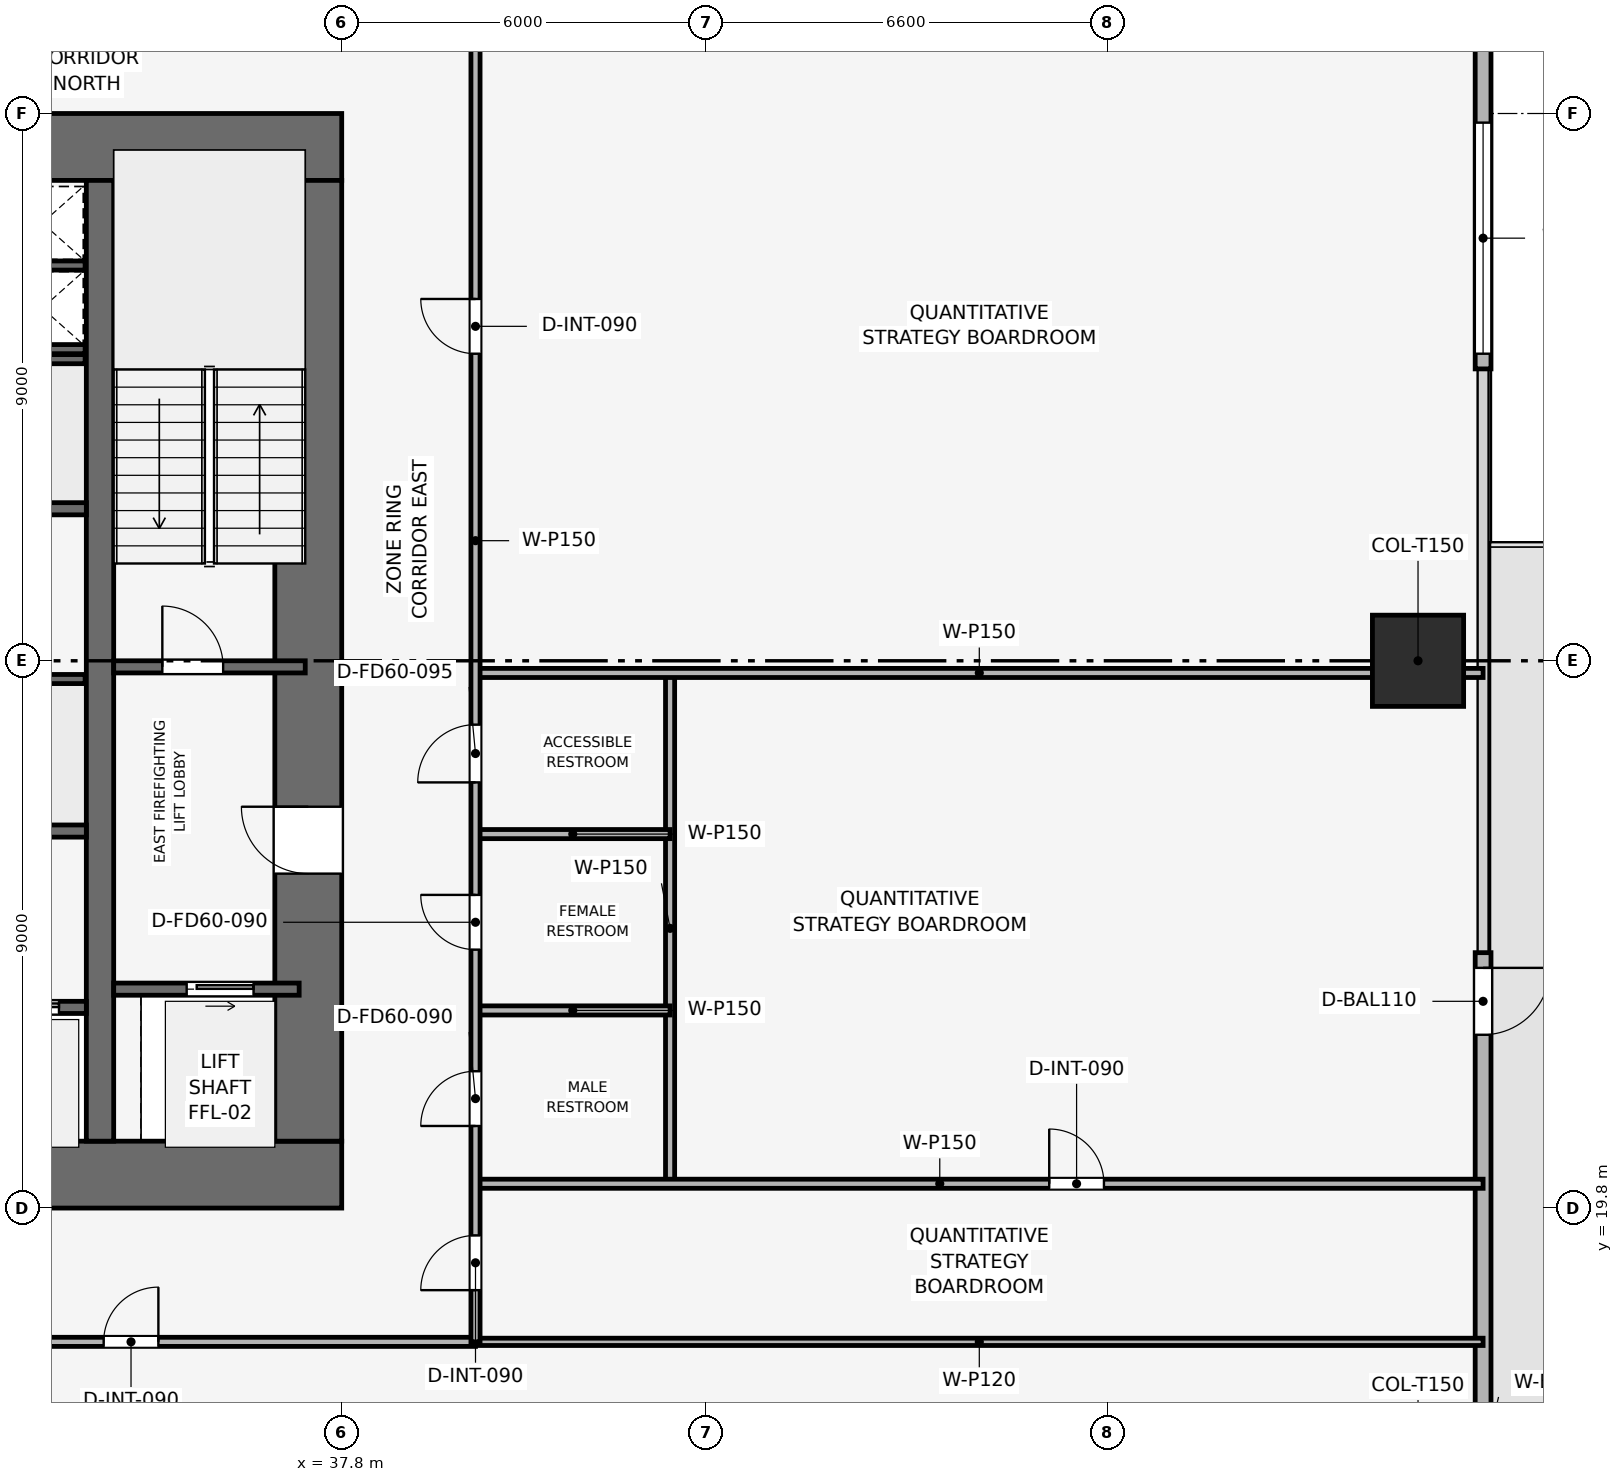
"""IFC4 building model, lengths in metres.
Left out: names, types, materials, properties, quantities, classifications, styles, units other than length and angle.
Written with IfcOpenShell. Run it as: python <this file> out.ifc"""

import sys

from ifc_helpers import new_model, si_unit, direction, frame, frame_2d, origin, origin_2d, place, context, subcontext, project, spatial, rectangle, extrude, element, fill, save


model = new_model("IFC4")
c1 = context("Model", 3, precision=1e-05, world=origin(), true_north=direction((0.0, 1.0)))
c2 = subcontext(c1, "Body", "Model", "MODEL_VIEW")
j1 = project(units=[si_unit("LENGTHUNIT", "METRE"), si_unit("PLANEANGLEUNIT", "RADIAN")], contexts=[c1])
p1 = place(None, origin())
s1 = spatial("IfcSite", under=j1, at=p1, CompositionType="ELEMENT")
p2 = place(p1, origin())
s2 = spatial("IfcBuilding", under=s1, at=p2, CompositionType="ELEMENT")
p3 = place(p2, frame((0.0, 0.0, 88.5)))
s3 = spatial("IfcBuildingStorey", under=s2, at=p3, CompositionType="ELEMENT", Elevation=88.5)
p4 = place(p3, frame((19.8, 20.35, 0.0), z_axis=(0.0, 0.0, 1.0), x_axis=(1.0, 0.0, 0.0)))
e1 = element("IfcWall", 1, at=p4, inside=s3, PredefinedType="SHEAR", context=c2, shape_type="SweptSolid", body=[
    extrude(rectangle(XDim=18.0, YDim=1.1, at=frame_2d((9.0, 0.0))), origin(), (0.0, 0.0, 1.0), 3.9),
])
p5 = place(p4, frame((8.4, 0.0, 0.0)))
e2 = element("IfcOpeningElement", 2, at=p5, cuts=e1, PredefinedType="OPENING", context=c2, shape_type="SweptSolid", body=[
    extrude(rectangle(XDim=1.2, YDim=2.2, at=frame_2d((0.6, 1.1))), frame((0.0, 0.56, 0.0), z_axis=(0.0, -1.0, 0.0), x_axis=(1.0, 0.0, 0.0)), (0.0, 0.0, 1.0), 1.12),
])
p6 = place(p3, frame((19.8, 37.25, 0.0), z_axis=(0.0, 0.0, 1.0), x_axis=(1.0, 0.0, 0.0)))
e3 = element("IfcWall", 3, at=p6, inside=s3, PredefinedType="SHEAR", context=c2, shape_type="SweptSolid", body=[
    extrude(rectangle(XDim=18.0, YDim=1.1, at=frame_2d((9.0, 0.0))), origin(), (0.0, 0.0, 1.0), 3.9),
])
p7 = place(p6, frame((7.05, 0.0, 0.0)))
e4 = element("IfcOpeningElement", 4, at=p7, cuts=e3, PredefinedType="OPENING", context=c2, shape_type="SweptSolid", body=[
    extrude(rectangle(XDim=1.1, YDim=2.15, at=frame_2d((0.55, 1.075))), frame((0.0, 0.56, 0.0), z_axis=(0.0, -1.0, 0.0), x_axis=(1.0, 0.0, 0.0)), (0.0, 0.0, 1.0), 1.12),
])
p8 = place(p3, frame((37.25, 20.9, 0.0), z_axis=(0.0, 0.0, 1.0), x_axis=(0.0, 1.0, 0.0)))
e5 = element("IfcWall", 5, at=p8, inside=s3, PredefinedType="SHEAR", context=c2, shape_type="SweptSolid", body=[
    extrude(rectangle(XDim=15.8, YDim=1.1, at=frame_2d((7.9, 0.0))), origin(), (0.0, 0.0, 1.0), 3.9),
])
p9 = place(p8, frame((4.4, 0.0, 0.0)))
e6 = element("IfcOpeningElement", 6, at=p9, cuts=e5, PredefinedType="OPENING", context=c2, shape_type="SweptSolid", body=[
    extrude(rectangle(XDim=1.1, YDim=2.15, at=frame_2d((0.55, 1.075))), frame((0.0, 0.56, 0.0), z_axis=(0.0, -1.0, 0.0), x_axis=(1.0, 0.0, 0.0)), (0.0, 0.0, 1.0), 1.12),
])
p10 = place(p3, frame((33.825, 20.9, 0.0), z_axis=(0.0, 0.0, 1.0), x_axis=(0.0, 1.0, 0.0)))
e7 = element("IfcWall", 7, at=p10, inside=s3, PredefinedType="SHEAR", context=c2, shape_type="SweptSolid", body=[
    extrude(rectangle(XDim=15.8, YDim=0.45, at=frame_2d((7.9, 0.0))), origin(), (0.0, 0.0, 1.0), 3.9),
])
p11 = place(p3, frame((55.5, 28.8, 0.003), z_axis=(0.0, 0.0, 1.0), x_axis=(1.0, 0.0, 0.0)))
e8 = element("IfcColumn", 8, at=p11, inside=s3, PredefinedType="COLUMN", context=c2, shape_type="SweptSolid", body=[
    extrude(rectangle(XDim=1.5, YDim=1.5, at=origin_2d()), origin(), (0.0, 0.0, 1.0), 3.644),
])
p12 = place(p3, frame((56.57, 48.9, 0.0), z_axis=(0.0, 0.0, 1.0), x_axis=(0.0, -1.0, 0.0)))
e9 = element("IfcWall", 9, at=p12, inside=s3, PredefinedType="SOLIDWALL", context=c2, shape_type="SweptSolid", body=[
    extrude(rectangle(XDim=15.3, YDim=0.26, at=frame_2d((7.65, 0.0))), origin(), (0.0, 0.0, 1.0), 3.65),
])
p13 = place(p12, frame((11.25, 0.0, 0.9)))
e10 = element("IfcOpeningElement", 10, at=p13, cuts=e9, PredefinedType="OPENING", context=c2, shape_type="SweptSolid", body=[
    extrude(rectangle(XDim=3.8, YDim=1.9, at=frame_2d((1.9, 0.95))), frame((0.0, 0.14, 0.0), z_axis=(0.0, -1.0, 0.0), x_axis=(1.0, 0.0, 0.0)), (0.0, 0.0, 1.0), 0.28),
])
p14 = place(p3, frame((56.57, 24.0, 0.0), z_axis=(0.0, 0.0, 1.0), x_axis=(0.0, -1.0, 0.0)))
e11 = element("IfcWall", 11, at=p14, inside=s3, PredefinedType="SOLIDWALL", context=c2, shape_type="SweptSolid", body=[
    extrude(rectangle(XDim=15.3, YDim=0.26, at=frame_2d((7.65, 0.0))), origin(), (0.0, 0.0, 1.0), 3.65),
])
p15 = place(p14, frame((0.25, 0.0, 0.0)))
e12 = element("IfcOpeningElement", 12, at=p15, cuts=e11, PredefinedType="OPENING", context=c2, shape_type="SweptSolid", body=[
    extrude(rectangle(XDim=1.1, YDim=2.2, at=frame_2d((0.55, 1.1))), frame((0.0, 0.14, 0.0), z_axis=(0.0, -1.0, 0.0), x_axis=(1.0, 0.0, 0.0)), (0.0, 0.0, 1.0), 0.28),
])
p16 = place(p3, frame((34.05, 28.7, 0.0), z_axis=(0.0, 0.0, 1.0), x_axis=(1.0, 0.0, 0.0)))
e13 = element("IfcWall", 13, at=p16, inside=s3, PredefinedType="SHEAR", context=c2, shape_type="SweptSolid", body=[
    extrude(rectangle(XDim=3.15, YDim=0.2, at=frame_2d((1.575, 0.0))), origin(), (0.0, 0.0, 1.0), 3.65),
])
p17 = place(p16, frame((0.8, 0.0, 0.0)))
e14 = element("IfcOpeningElement", 14, at=p17, cuts=e13, PredefinedType="OPENING", context=c2, shape_type="SweptSolid", body=[
    extrude(rectangle(XDim=1.0, YDim=2.1, at=frame_2d((0.5, 1.05))), frame((0.0, 0.11, 0.0), z_axis=(0.0, -1.0, 0.0), x_axis=(1.0, 0.0, 0.0)), (0.0, 0.0, 1.0), 0.22),
])
for number, where, z_axis, x_axis in (
    (15, (32.25, 33.925, 0.0), (0.0, 0.0, 1.0), (1.0, 0.0, 0.0)),
    (16, (32.25, 35.3, 0.0), (0.0, 0.0, 1.0), (1.0, 0.0, 0.0)),
):
    element("IfcWall", number, at=place(p3, frame(where, z_axis=z_axis, x_axis=x_axis)), inside=s3, PredefinedType="SHEAR", context=c2, shape_type="SweptSolid", body=[
        extrude(rectangle(XDim=1.33, YDim=0.15, at=frame_2d((0.665, 0.0))), origin(), (0.0, 0.0, 1.0), 3.65),
    ])
p18 = place(p3, frame((34.05, 23.4, 0.0), z_axis=(0.0, 0.0, 1.0), x_axis=(1.0, 0.0, 0.0)))
e17 = element("IfcWall", 17, at=p18, inside=s3, PredefinedType="SHEAR", context=c2, shape_type="SweptSolid", body=[
    extrude(rectangle(XDim=3.05, YDim=0.2, at=frame_2d((1.525, 0.0))), origin(), (0.0, 0.0, 1.0), 3.65),
])
p19 = place(p18, frame((1.2, 0.0, 0.0)))
e18 = element("IfcOpeningElement", 18, at=p19, cuts=e17, PredefinedType="OPENING", context=c2, shape_type="SweptSolid", body=[
    extrude(rectangle(XDim=1.1, YDim=2.15, at=frame_2d((0.55, 1.075))), frame((0.0, 0.11, 0.0), z_axis=(0.0, -1.0, 0.0), x_axis=(1.0, 0.0, 0.0)), (0.0, 0.0, 1.0), 0.22),
])
p20 = place(p3, frame((31.6, 23.1, 0.0), z_axis=(0.0, 0.0, 1.0), x_axis=(1.0, 0.0, 0.0)))
e19 = element("IfcWall", 19, at=p20, inside=s3, PredefinedType="SHEAR", context=c2, shape_type="SweptSolid", body=[
    extrude(rectangle(XDim=2.0, YDim=0.2, at=frame_2d((1.0, 0.0))), origin(), (0.0, 0.0, 1.0), 3.65),
])
p21 = place(p20, frame((0.45, 0.0, 0.0)))
e20 = element("IfcOpeningElement", 20, at=p21, cuts=e19, PredefinedType="OPENING", context=c2, shape_type="SweptSolid", body=[
    extrude(rectangle(XDim=1.1, YDim=2.15, at=frame_2d((0.55, 1.075))), frame((0.0, 0.11, 0.0), z_axis=(0.0, -1.0, 0.0), x_axis=(1.0, 0.0, 0.0)), (0.0, 0.0, 1.0), 0.22),
])
for number, where, z_axis, x_axis in (
    (21, (31.6, 26.0, 0.0), (0.0, 0.0, 1.0), (1.0, 0.0, 0.0)),
    (22, (31.6, 31.3, 0.0), (0.0, 0.0, 1.0), (1.0, 0.0, 0.0)),
):
    element("IfcWall", number, at=place(p3, frame(where, z_axis=z_axis, x_axis=x_axis)), inside=s3, PredefinedType="SHEAR", context=c2, shape_type="SweptSolid", body=[
        extrude(rectangle(XDim=2.0, YDim=0.2, at=frame_2d((1.0, 0.0))), origin(), (0.0, 0.0, 1.0), 3.65),
    ])
for number, where, z_axis, x_axis in (
    (23, (29.5, 28.5, 0.0), (0.0, 0.0, 1.0), (1.0, 0.0, 0.0)),
    (24, (29.5, 33.76, 0.0), (0.0, 0.0, 1.0), (1.0, 0.0, 0.0)),
):
    element("IfcWall", number, at=place(p3, frame(where, z_axis=z_axis, x_axis=x_axis)), inside=s3, PredefinedType="SHEAR", context=c2, shape_type="SweptSolid", body=[
        extrude(rectangle(XDim=4.08, YDim=0.15, at=frame_2d((2.04, 0.0))), origin(), (0.0, 0.0, 1.0), 3.65),
    ])
p22 = place(p3, frame((40.0, 17.6, 0.0), z_axis=(0.0, 0.0, 1.0), x_axis=(1.0, 0.0, 0.0)))
e25 = element("IfcWall", 25, at=p22, inside=s3, PredefinedType="PARTITIONING", context=c2, shape_type="SweptSolid", body=[
    extrude(rectangle(XDim=16.57, YDim=0.12, at=frame_2d((8.285, 0.0))), origin(), (0.0, 0.0, 1.0), 2.935),
])
p23 = place(p3, frame((43.2, 20.2, 0.0), z_axis=(0.0, 0.0, 1.0), x_axis=(0.0, 1.0, 0.0)))
e26 = element("IfcWall", 26, at=p23, inside=s3, PredefinedType="PARTITIONING", context=c2, shape_type="SweptSolid", body=[
    extrude(rectangle(XDim=8.4, YDim=0.15, at=frame_2d((4.2, 0.0))), origin(), (0.0, 0.0, 1.0), 3.085),
])
p24 = place(p3, frame((40.0, 20.2, 0.0), z_axis=(0.0, 0.0, 1.0), x_axis=(1.0, 0.0, 0.0)))
e27 = element("IfcWall", 27, at=p24, inside=s3, PredefinedType="PARTITIONING", context=c2, shape_type="SweptSolid", body=[
    extrude(rectangle(XDim=16.57, YDim=0.15, at=frame_2d((8.285, 0.0))), origin(), (0.0, 0.0, 1.0), 2.935),
])
p25 = place(p24, frame((9.435, 0.0, 0.0)))
e28 = element("IfcOpeningElement", 28, at=p25, cuts=e27, PredefinedType="OPENING", context=c2, shape_type="SweptSolid", body=[
    extrude(rectangle(XDim=0.9, YDim=2.1, at=frame_2d((0.45, 1.05))), frame((0.0, 0.085, 0.0), z_axis=(0.0, -1.0, 0.0), x_axis=(1.0, 0.0, 0.0)), (0.0, 0.0, 1.0), 0.17),
])
p26 = place(p3, frame((40.0, 28.6, 0.0), z_axis=(0.0, 0.0, 1.0), x_axis=(1.0, 0.0, 0.0)))
e29 = element("IfcWall", 29, at=p26, inside=s3, PredefinedType="PARTITIONING", context=c2, shape_type="SweptSolid", body=[
    extrude(rectangle(XDim=16.57, YDim=0.15, at=frame_2d((8.285, 0.0))), origin(), (0.0, 0.0, 1.0), 2.935),
])
for number, where, z_axis, x_axis in (
    (30, (40.0, 23.05, 0.0), (0.0, 0.0, 1.0), (1.0, 0.0, 0.0)),
    (31, (40.0, 25.95, 0.0), (0.0, 0.0, 1.0), (1.0, 0.0, 0.0)),
):
    element("IfcWall", number, at=place(p3, frame(where, z_axis=z_axis, x_axis=x_axis)), inside=s3, PredefinedType="PARTITIONING", context=c2, shape_type="SweptSolid", body=[
        extrude(rectangle(XDim=3.2, YDim=0.15, at=frame_2d((1.6, 0.0))), origin(), (0.0, 0.0, 1.0), 3.65),
    ])
p27 = place(p3, frame((17.6, 17.6, 0.0), z_axis=(0.0, 0.0, 1.0), x_axis=(1.0, 0.0, 0.0)))
e32 = element("IfcWall", 32, at=p27, inside=s3, PredefinedType="PARTITIONING", context=c2, shape_type="SweptSolid", body=[
    extrude(rectangle(XDim=22.4, YDim=0.15, at=frame_2d((11.2, 0.0))), origin(), (0.0, 0.0, 1.0), 3.085),
])
p28 = place(p27, frame((0.72, 0.0, 0.0)))
e33 = element("IfcOpeningElement", 33, at=p28, cuts=e32, PredefinedType="OPENING", context=c2, shape_type="SweptSolid", body=[
    extrude(rectangle(XDim=0.9, YDim=2.1, at=frame_2d((0.45, 1.05))), frame((0.0, 0.085, 0.0), z_axis=(0.0, -1.0, 0.0), x_axis=(1.0, 0.0, 0.0)), (0.0, 0.0, 1.0), 0.17),
])
p29 = place(p27, frame((6.255, 0.0, 0.0)))
e34 = element("IfcOpeningElement", 34, at=p29, cuts=e32, PredefinedType="OPENING", context=c2, shape_type="SweptSolid", body=[
    extrude(rectangle(XDim=0.9, YDim=2.1, at=frame_2d((0.45, 1.05))), frame((0.0, 0.085, 0.0), z_axis=(0.0, -1.0, 0.0), x_axis=(1.0, 0.0, 0.0)), (0.0, 0.0, 1.0), 0.17),
])
p30 = place(p27, frame((16.285, 0.0, 0.0)))
e35 = element("IfcOpeningElement", 35, at=p30, cuts=e32, PredefinedType="OPENING", context=c2, shape_type="SweptSolid", body=[
    extrude(rectangle(XDim=0.9, YDim=2.1, at=frame_2d((0.45, 1.05))), frame((0.0, 0.085, 0.0), z_axis=(0.0, -1.0, 0.0), x_axis=(1.0, 0.0, 0.0)), (0.0, 0.0, 1.0), 0.17),
])
p31 = place(p3, frame((40.0, 17.6, 0.0), z_axis=(0.0, 0.0, 1.0), x_axis=(0.0, 1.0, 0.0)))
e36 = element("IfcWall", 36, at=p31, inside=s3, PredefinedType="PARTITIONING", context=c2, shape_type="SweptSolid", body=[
    extrude(rectangle(XDim=22.4, YDim=0.15, at=frame_2d((11.2, 0.0))), origin(), (0.0, 0.0, 1.0), 3.085),
])
p32 = place(p31, frame((0.85, 0.0, 0.0)))
e37 = element("IfcOpeningElement", 37, at=p32, cuts=e36, PredefinedType="OPENING", context=c2, shape_type="SweptSolid", body=[
    extrude(rectangle(XDim=0.9, YDim=2.1, at=frame_2d((0.45, 1.05))), frame((0.0, 0.085, 0.0), z_axis=(0.0, -1.0, 0.0), x_axis=(1.0, 0.0, 0.0)), (0.0, 0.0, 1.0), 0.17),
])
p33 = place(p31, frame((3.55, 0.0, 0.0)))
e38 = element("IfcOpeningElement", 38, at=p33, cuts=e36, PredefinedType="OPENING", context=c2, shape_type="SweptSolid", body=[
    extrude(rectangle(XDim=0.9, YDim=2.1, at=frame_2d((0.45, 1.05))), frame((0.0, 0.085, 0.0), z_axis=(0.0, -1.0, 0.0), x_axis=(1.0, 0.0, 0.0)), (0.0, 0.0, 1.0), 0.17),
])
p34 = place(p31, frame((6.45, 0.0, 0.0)))
e39 = element("IfcOpeningElement", 39, at=p34, cuts=e36, PredefinedType="OPENING", context=c2, shape_type="SweptSolid", body=[
    extrude(rectangle(XDim=0.9, YDim=2.1, at=frame_2d((0.45, 1.05))), frame((0.0, 0.085, 0.0), z_axis=(0.0, -1.0, 0.0), x_axis=(1.0, 0.0, 0.0)), (0.0, 0.0, 1.0), 0.17),
])
p35 = place(p31, frame((9.2, 0.0, 0.0)))
e40 = element("IfcOpeningElement", 40, at=p35, cuts=e36, PredefinedType="OPENING", context=c2, shape_type="SweptSolid", body=[
    extrude(rectangle(XDim=0.95, YDim=2.1, at=frame_2d((0.475, 1.05))), frame((0.0, 0.085, 0.0), z_axis=(0.0, -1.0, 0.0), x_axis=(1.0, 0.0, 0.0)), (0.0, 0.0, 1.0), 0.17),
])
p36 = place(p31, frame((16.25, 0.0, 0.0)))
e41 = element("IfcOpeningElement", 41, at=p36, cuts=e36, PredefinedType="OPENING", context=c2, shape_type="SweptSolid", body=[
    extrude(rectangle(XDim=0.9, YDim=2.1, at=frame_2d((0.45, 1.05))), frame((0.0, 0.085, 0.0), z_axis=(0.0, -1.0, 0.0), x_axis=(1.0, 0.0, 0.0)), (0.0, 0.0, 1.0), 0.17),
])
p37 = place(p15, origin())
e42 = element("IfcDoor", 42, at=p37, inside=s3, OperationType="SINGLE_SWING_LEFT", PredefinedType="DOOR", context=c2, shape_type="SweptSolid", body=[
    extrude(rectangle(XDim=1.1, YDim=2.2, at=frame_2d((0.55, 1.1))), frame((0.0, 0.025, 0.0), z_axis=(0.0, -1.0, 0.0), x_axis=(1.0, 0.0, 0.0)), (0.0, 0.0, 1.0), 0.05),
])
fill(e12, e42)
p38 = place(p13, origin())
e43 = element("IfcWindow", 43, at=p38, inside=s3, PartitioningType="SINGLE_PANEL", PredefinedType="WINDOW", context=c2, shape_type="SweptSolid", body=[
    extrude(rectangle(XDim=3.8, YDim=1.9, at=frame_2d((1.9, 0.95))), frame((0.0, 0.03, 0.0), z_axis=(0.0, -1.0, 0.0), x_axis=(1.0, 0.0, 0.0)), (0.0, 0.0, 1.0), 0.06),
])
fill(e10, e43)
p39 = place(p17, origin())
e44 = element("IfcDoor", 44, at=p39, inside=s3, OperationType="SINGLE_SWING_LEFT", PredefinedType="DOOR", context=c2, shape_type="SweptSolid", body=[
    extrude(rectangle(XDim=1.0, YDim=2.1, at=frame_2d((0.5, 1.05))), frame((0.0, 0.025, 0.0), z_axis=(0.0, -1.0, 0.0), x_axis=(1.0, 0.0, 0.0)), (0.0, 0.0, 1.0), 0.05),
])
fill(e14, e44)
p40 = place(p19, origin())
e45 = element("IfcDoor", 45, at=p40, inside=s3, OperationType="SLIDING_TO_RIGHT", PredefinedType="DOOR", context=c2, shape_type="SweptSolid", body=[
    extrude(rectangle(XDim=1.1, YDim=2.15, at=frame_2d((0.55, 1.075))), frame((0.0, 0.025, 0.0), z_axis=(0.0, -1.0, 0.0), x_axis=(1.0, 0.0, 0.0)), (0.0, 0.0, 1.0), 0.05),
])
fill(e18, e45)
p41 = place(p21, origin())
e46 = element("IfcDoor", 46, at=p41, inside=s3, OperationType="SLIDING_TO_RIGHT", PredefinedType="DOOR", context=c2, shape_type="SweptSolid", body=[
    extrude(rectangle(XDim=1.1, YDim=2.15, at=frame_2d((0.55, 1.075))), frame((0.0, 0.025, 0.0), z_axis=(0.0, -1.0, 0.0), x_axis=(1.0, 0.0, 0.0)), (0.0, 0.0, 1.0), 0.05),
])
fill(e20, e46)
p42 = place(p25, origin())
e47 = element("IfcDoor", 47, at=p42, inside=s3, OperationType="SINGLE_SWING_LEFT", PredefinedType="DOOR", context=c2, shape_type="SweptSolid", body=[
    extrude(rectangle(XDim=0.9, YDim=2.1, at=frame_2d((0.45, 1.05))), frame((0.0, 0.025, 0.0), z_axis=(0.0, -1.0, 0.0), x_axis=(1.0, 0.0, 0.0)), (0.0, 0.0, 1.0), 0.05),
])
fill(e28, e47)
p43 = place(p30, origin())
e48 = element("IfcDoor", 48, at=p43, inside=s3, OperationType="SINGLE_SWING_RIGHT", PredefinedType="DOOR", context=c2, shape_type="SweptSolid", body=[
    extrude(rectangle(XDim=0.9, YDim=2.1, at=frame_2d((0.45, 1.05))), frame((0.0, 0.025, 0.0), z_axis=(0.0, -1.0, 0.0), x_axis=(1.0, 0.0, 0.0)), (0.0, 0.0, 1.0), 0.05),
])
fill(e35, e48)
p44 = place(p32, origin())
e49 = element("IfcDoor", 49, at=p44, inside=s3, OperationType="SINGLE_SWING_LEFT", PredefinedType="DOOR", context=c2, shape_type="SweptSolid", body=[
    extrude(rectangle(XDim=0.9, YDim=2.1, at=frame_2d((0.45, 1.05))), frame((0.0, 0.025, 0.0), z_axis=(0.0, -1.0, 0.0), x_axis=(1.0, 0.0, 0.0)), (0.0, 0.0, 1.0), 0.05),
])
fill(e37, e49)
p45 = place(p33, origin())
e50 = element("IfcDoor", 50, at=p45, inside=s3, OperationType="SINGLE_SWING_LEFT", PredefinedType="DOOR", context=c2, shape_type="SweptSolid", body=[
    extrude(rectangle(XDim=0.9, YDim=2.1, at=frame_2d((0.45, 1.05))), frame((0.0, 0.025, 0.0), z_axis=(0.0, -1.0, 0.0), x_axis=(1.0, 0.0, 0.0)), (0.0, 0.0, 1.0), 0.05),
])
fill(e38, e50)
p46 = place(p34, origin())
e51 = element("IfcDoor", 51, at=p46, inside=s3, OperationType="SINGLE_SWING_RIGHT", PredefinedType="DOOR", context=c2, shape_type="SweptSolid", body=[
    extrude(rectangle(XDim=0.9, YDim=2.1, at=frame_2d((0.45, 1.05))), frame((0.0, 0.025, 0.0), z_axis=(0.0, -1.0, 0.0), x_axis=(1.0, 0.0, 0.0)), (0.0, 0.0, 1.0), 0.05),
])
fill(e39, e51)
p47 = place(p35, origin())
e52 = element("IfcDoor", 52, at=p47, inside=s3, OperationType="SINGLE_SWING_LEFT", PredefinedType="DOOR", context=c2, shape_type="SweptSolid", body=[
    extrude(rectangle(XDim=0.95, YDim=2.1, at=frame_2d((0.475, 1.05))), frame((0.0, 0.025, 0.0), z_axis=(0.0, -1.0, 0.0), x_axis=(1.0, 0.0, 0.0)), (0.0, 0.0, 1.0), 0.05),
])
fill(e40, e52)
p48 = place(p36, origin())
e53 = element("IfcDoor", 53, at=p48, inside=s3, OperationType="SINGLE_SWING_RIGHT", PredefinedType="DOOR", context=c2, shape_type="SweptSolid", body=[
    extrude(rectangle(XDim=0.9, YDim=2.1, at=frame_2d((0.45, 1.05))), frame((0.0, 0.025, 0.0), z_axis=(0.0, -1.0, 0.0), x_axis=(1.0, 0.0, 0.0)), (0.0, 0.0, 1.0), 0.05),
])
fill(e41, e53)
p49 = place(p9, origin())
e54 = element("IfcDoor", 54, at=p49, inside=s3, OperationType="SINGLE_SWING_RIGHT", PredefinedType="DOOR", context=c2, shape_type="SweptSolid", body=[
    extrude(rectangle(XDim=1.1, YDim=2.15, at=frame_2d((0.55, 1.075))), frame((0.0, 0.025, 0.0), z_axis=(0.0, -1.0, 0.0), x_axis=(1.0, 0.0, 0.0)), (0.0, 0.0, 1.0), 0.05),
])
fill(e6, e54)
save(model, sys.argv[1])
